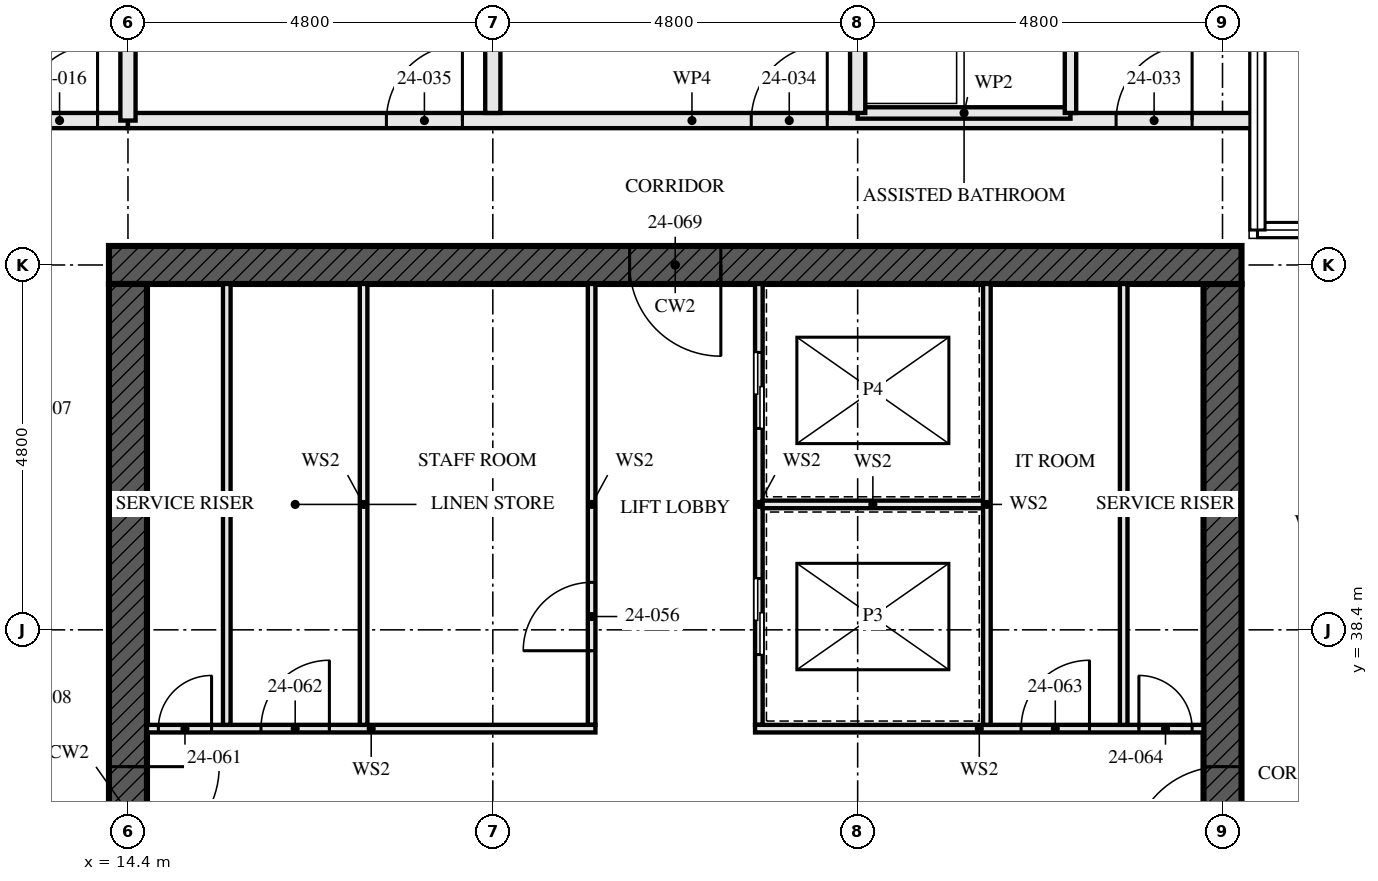
"""IFC4 building model, lengths in metres.
Left out: names, types, materials, properties, quantities, classifications, styles, units other than length and angle.
Written with IfcOpenShell. Run it as: python <this file> out.ifc"""

import sys

from ifc_helpers import new_model, si_unit, direction, frame, frame_2d, origin, place, context, subcontext, project, spatial, rectangle, extrude, element, fill, save


model = new_model("IFC4")
c1 = context("Model", 3, precision=1e-05, world=origin(), true_north=direction((0.0, 1.0)))
c2 = subcontext(c1, "Body", "Model", "MODEL_VIEW")
j1 = project(units=[si_unit("LENGTHUNIT", "METRE"), si_unit("PLANEANGLEUNIT", "RADIAN")], contexts=[c1])
p1 = place(None, origin())
s1 = spatial("IfcSite", under=j1, at=p1, CompositionType="ELEMENT")
p2 = place(p1, origin())
s2 = spatial("IfcBuilding", under=s1, at=p2, CompositionType="ELEMENT")
p3 = place(p2, frame((0.0, 0.0, 91.0)))
s3 = spatial("IfcBuildingStorey", under=s2, at=p3, CompositionType="ELEMENT", Elevation=91.0)
p4 = place(p3, frame((29.05, 43.2, -0.17), z_axis=(0.0, 0.0, 1.0), x_axis=(-1.0, 0.0, 0.0)))
e1 = element("IfcWall", 1, at=p4, inside=s3, PredefinedType="SHEAR", context=c2, shape_type="SweptSolid", body=[
    extrude(rectangle(XDim=14.9, YDim=0.5, at=frame_2d((7.45, 0.0))), origin(), (0.0, 0.0, 1.0), 3.5),
])
p5 = place(p4, frame((6.85, 0.0, 0.17)))
e2 = element("IfcOpeningElement", 2, at=p5, cuts=e1, PredefinedType="OPENING", context=c2, shape_type="SweptSolid", body=[
    extrude(rectangle(XDim=1.2, YDim=2.1, at=frame_2d((0.6, 1.05))), frame((0.0, 0.26, 0.0), z_axis=(0.0, -1.0, 0.0), x_axis=(1.0, 0.0, 0.0)), (0.0, 0.0, 1.0), 0.521),
])
p6 = place(p3, frame((14.4, 42.95, -0.17), z_axis=(0.0, 0.0, 1.0), x_axis=(0.0, -1.0, 0.0)))
e3 = element("IfcWall", 3, at=p6, inside=s3, PredefinedType="SHEAR", context=c2, shape_type="SweptSolid", body=[
    extrude(rectangle(XDim=13.9, YDim=0.5, at=frame_2d((6.95, 0.0))), origin(), (0.0, 0.0, 1.0), 3.5),
])
p7 = place(p6, frame((6.35, 0.0, 0.17)))
e4 = element("IfcOpeningElement", 4, at=p7, cuts=e3, PredefinedType="OPENING", context=c2, shape_type="SweptSolid", body=[
    extrude(rectangle(XDim=1.2, YDim=2.1, at=frame_2d((0.6, 1.05))), frame((0.0, 0.26, 0.0), z_axis=(0.0, -1.0, 0.0), x_axis=(1.0, 0.0, 0.0)), (0.0, 0.0, 1.0), 0.521),
])
p8 = place(p3, frame((28.8, 29.05, -0.17), z_axis=(0.0, 0.0, 1.0), x_axis=(0.0, 1.0, 0.0)))
e5 = element("IfcWall", 5, at=p8, inside=s3, PredefinedType="SHEAR", context=c2, shape_type="SweptSolid", body=[
    extrude(rectangle(XDim=13.9, YDim=0.5, at=frame_2d((6.95, 0.0))), origin(), (0.0, 0.0, 1.0), 3.5),
])
p9 = place(p8, frame((6.35, 0.0, 0.17)))
e6 = element("IfcOpeningElement", 6, at=p9, cuts=e5, PredefinedType="OPENING", context=c2, shape_type="SweptSolid", body=[
    extrude(rectangle(XDim=1.2, YDim=2.1, at=frame_2d((0.6, 1.05))), frame((0.0, 0.26, 0.0), z_axis=(0.0, -1.0, 0.0), x_axis=(1.0, 0.0, 0.0)), (0.0, 0.0, 1.0), 0.521),
])
p10 = place(p3, frame((14.4, 45.1, 0.0), z_axis=(0.0, 0.0, 1.0), x_axis=(-1.0, 0.0, 0.0)))
e7 = element("IfcWall", 7, at=p10, inside=s3, PredefinedType="PARTITIONING", context=c2, shape_type="SweptSolid", body=[
    extrude(rectangle(XDim=9.6, YDim=0.2, at=frame_2d((4.8, 0.0))), origin(), (0.0, 0.0, 1.0), 3.33),
])
p11 = place(p10, frame((0.4, 0.0, 0.0)))
e8 = element("IfcOpeningElement", 8, at=p11, cuts=e7, PredefinedType="OPENING", context=c2, shape_type="SweptSolid", body=[
    extrude(rectangle(XDim=1.0, YDim=2.1, at=frame_2d((0.5, 1.05))), frame((0.0, 0.111, 0.0), z_axis=(0.0, -1.0, 0.0), x_axis=(1.0, 0.0, 0.0)), (0.0, 0.0, 1.0), 0.221),
])
p12 = place(p10, frame((5.2, 0.0, 0.0)))
e9 = element("IfcOpeningElement", 9, at=p12, cuts=e7, PredefinedType="OPENING", context=c2, shape_type="SweptSolid", body=[
    extrude(rectangle(XDim=1.0, YDim=2.1, at=frame_2d((0.5, 1.05))), frame((0.0, 0.111, 0.0), z_axis=(0.0, -1.0, 0.0), x_axis=(1.0, 0.0, 0.0)), (0.0, 0.0, 1.0), 0.221),
])
p13 = place(p3, frame((26.8, 48.2, 0.0), z_axis=(0.0, 0.0, 1.0), x_axis=(0.0, -1.0, 0.0)))
e10 = element("IfcWall", 10, at=p13, inside=s3, PredefinedType="PARTITIONING", context=c2, shape_type="SweptSolid", body=[
    extrude(rectangle(XDim=3.0, YDim=0.15, at=frame_2d((1.5, 0.0))), origin(), (0.0, 0.0, 1.0), 2.55),
])
p14 = place(p13, frame((1.05, 0.0, 0.0)))
e11 = element("IfcOpeningElement", 11, at=p14, cuts=e10, PredefinedType="OPENING", context=c2, shape_type="SweptSolid", body=[
    extrude(rectangle(XDim=0.9, YDim=2.1, at=frame_2d((0.45, 1.05))), frame((0.0, 0.085, 0.0), z_axis=(0.0, -1.0, 0.0), x_axis=(1.0, 0.0, 0.0)), (0.0, 0.0, 1.0), 0.171),
])
p15 = place(p3, frame((26.8, 45.2, 0.0), z_axis=(0.0, 0.0, 1.0), x_axis=(-1.0, 0.0, 0.0)))
e12 = element("IfcWall", 12, at=p15, inside=s3, PredefinedType="PARTITIONING", context=c2, shape_type="SweptSolid", body=[
    extrude(rectangle(XDim=2.8, YDim=0.15, at=frame_2d((1.4, 0.0))), origin(), (0.0, 0.0, 1.0), 3.33),
])
p16 = place(p3, frame((24.0, 52.48, 0.0), z_axis=(0.0, 0.0, 1.0), x_axis=(0.0, -1.0, 0.0)))
e13 = element("IfcWall", 13, at=p16, inside=s3, PredefinedType="PARTITIONING", context=c2, shape_type="SweptSolid", body=[
    extrude(rectangle(XDim=7.28, YDim=0.2, at=frame_2d((3.64, 0.0))), origin(), (0.0, 0.0, 1.0), 2.55),
])
p17 = place(p3, frame((19.2, 57.28, 0.0), z_axis=(0.0, 0.0, 1.0), x_axis=(0.0, -1.0, 0.0)))
e14 = element("IfcWall", 14, at=p17, inside=s3, PredefinedType="PARTITIONING", context=c2, shape_type="SweptSolid", body=[
    extrude(rectangle(XDim=12.08, YDim=0.2, at=frame_2d((6.04, 0.0))), origin(), (0.0, 0.0, 1.0), 2.55),
])
p18 = place(p3, frame((29.24, 45.1, 0.0), z_axis=(0.0, 0.0, 1.0), x_axis=(-1.0, 0.0, 0.0)))
e15 = element("IfcWall", 15, at=p18, inside=s3, PredefinedType="PARTITIONING", context=c2, shape_type="SweptSolid", body=[
    extrude(rectangle(XDim=14.84, YDim=0.2, at=frame_2d((7.42, 0.0))), origin(), (0.0, 0.0, 1.0), 2.32),
])
p19 = place(p18, frame((0.84, 0.0, 0.0)))
e16 = element("IfcOpeningElement", 16, at=p19, cuts=e15, PredefinedType="OPENING", context=c2, shape_type="SweptSolid", body=[
    extrude(rectangle(XDim=1.0, YDim=2.1, at=frame_2d((0.5, 1.05))), frame((0.0, 0.111, 0.0), z_axis=(0.0, -1.0, 0.0), x_axis=(1.0, 0.0, 0.0)), (0.0, 0.0, 1.0), 0.221),
])
p20 = place(p18, frame((5.64, 0.0, 0.0)))
e17 = element("IfcOpeningElement", 17, at=p20, cuts=e15, PredefinedType="OPENING", context=c2, shape_type="SweptSolid", body=[
    extrude(rectangle(XDim=1.0, YDim=2.1, at=frame_2d((0.5, 1.05))), frame((0.0, 0.111, 0.0), z_axis=(0.0, -1.0, 0.0), x_axis=(1.0, 0.0, 0.0)), (0.0, 0.0, 1.0), 0.221),
])
p21 = place(p18, frame((10.44, 0.0, 0.0)))
e18 = element("IfcOpeningElement", 18, at=p21, cuts=e15, PredefinedType="OPENING", context=c2, shape_type="SweptSolid", body=[
    extrude(rectangle(XDim=1.0, YDim=2.1, at=frame_2d((0.5, 1.05))), frame((0.0, 0.111, 0.0), z_axis=(0.0, -1.0, 0.0), x_axis=(1.0, 0.0, 0.0)), (0.0, 0.0, 1.0), 0.221),
])
for number, where, z_axis, x_axis in (
    (19, (15.7, 37.15, 0.0), (0.0, 0.0, 1.0), (0.0, 1.0, 0.0)),
    (20, (27.5, 37.15, 0.0), (0.0, 0.0, 1.0), (0.0, 1.0, 0.0)),
):
    element("IfcWall", number, at=place(p3, frame(where, z_axis=z_axis, x_axis=x_axis)), inside=s3, PredefinedType="SOLIDWALL", context=c2, shape_type="SweptSolid", body=[
        extrude(rectangle(XDim=5.8, YDim=0.1, at=frame_2d((2.9, 0.0))), origin(), (0.0, 0.0, 1.0), 3.33),
    ])
p22 = place(p3, frame((20.5, 37.15, 0.0), z_axis=(0.0, 0.0, 1.0), x_axis=(0.0, 1.0, 0.0)))
e21 = element("IfcWall", 21, at=p22, inside=s3, PredefinedType="SOLIDWALL", context=c2, shape_type="SweptSolid", body=[
    extrude(rectangle(XDim=5.8, YDim=0.1, at=frame_2d((2.9, 0.0))), origin(), (0.0, 0.0, 1.0), 3.33),
])
p23 = place(p22, frame((0.975, 0.0, 0.0)))
e22 = element("IfcOpeningElement", 22, at=p23, cuts=e21, PredefinedType="OPENING", context=c2, shape_type="SweptSolid", body=[
    extrude(rectangle(XDim=0.9, YDim=2.1, at=frame_2d((0.45, 1.05))), frame((0.0, 0.061, 0.0), z_axis=(0.0, -1.0, 0.0), x_axis=(1.0, 0.0, 0.0)), (0.0, 0.0, 1.0), 0.121),
])
p24 = place(p3, frame((22.7, 37.15, 0.0), z_axis=(0.0, 0.0, 1.0), x_axis=(0.0, 1.0, 0.0)))
e23 = element("IfcWall", 23, at=p24, inside=s3, PredefinedType="SOLIDWALL", context=c2, shape_type="SweptSolid", body=[
    extrude(rectangle(XDim=5.8, YDim=0.1, at=frame_2d((2.9, 0.0))), origin(), (0.0, 0.0, 1.0), 3.33),
])
p25 = place(p24, frame((0.925, 0.0, 0.0)))
e24 = element("IfcOpeningElement", 24, at=p25, cuts=e23, PredefinedType="OPENING", context=c2, shape_type="SweptSolid", body=[
    extrude(rectangle(XDim=1.0, YDim=2.1, at=frame_2d((0.5, 1.05))), frame((0.0, 0.061, 0.0), z_axis=(0.0, -1.0, 0.0), x_axis=(1.0, 0.0, 0.0)), (0.0, 0.0, 1.0), 0.121),
])
p26 = place(p24, frame((3.9, 0.0, 0.0)))
e25 = element("IfcOpeningElement", 25, at=p26, cuts=e23, PredefinedType="OPENING", context=c2, shape_type="SweptSolid", body=[
    extrude(rectangle(XDim=1.0, YDim=2.1, at=frame_2d((0.5, 1.05))), frame((0.0, 0.061, 0.0), z_axis=(0.0, -1.0, 0.0), x_axis=(1.0, 0.0, 0.0)), (0.0, 0.0, 1.0), 0.121),
])
p27 = place(p3, frame((14.65, 37.1, 0.0), z_axis=(0.0, 0.0, 1.0), x_axis=(1.0, 0.0, 0.0)))
e26 = element("IfcWall", 26, at=p27, inside=s3, PredefinedType="SOLIDWALL", context=c2, shape_type="SweptSolid", body=[
    extrude(rectangle(XDim=5.9, YDim=0.1, at=frame_2d((2.95, 0.0))), origin(), (0.0, 0.0, 1.0), 3.33),
])
p28 = place(p27, frame((0.15, 0.0, 0.0)))
e27 = element("IfcOpeningElement", 27, at=p28, cuts=e26, PredefinedType="OPENING", context=c2, shape_type="SweptSolid", body=[
    extrude(rectangle(XDim=0.7, YDim=2.1, at=frame_2d((0.35, 1.05))), frame((0.0, 0.061, 0.0), z_axis=(0.0, -1.0, 0.0), x_axis=(1.0, 0.0, 0.0)), (0.0, 0.0, 1.0), 0.121),
])
p29 = place(p27, frame((1.5, 0.0, 0.0)))
e28 = element("IfcOpeningElement", 28, at=p29, cuts=e26, PredefinedType="OPENING", context=c2, shape_type="SweptSolid", body=[
    extrude(rectangle(XDim=0.9, YDim=2.1, at=frame_2d((0.45, 1.05))), frame((0.0, 0.061, 0.0), z_axis=(0.0, -1.0, 0.0), x_axis=(1.0, 0.0, 0.0)), (0.0, 0.0, 1.0), 0.121),
])
p30 = place(p3, frame((22.65, 37.1, 0.0), z_axis=(0.0, 0.0, 1.0), x_axis=(1.0, 0.0, 0.0)))
e29 = element("IfcWall", 29, at=p30, inside=s3, PredefinedType="SOLIDWALL", context=c2, shape_type="SweptSolid", body=[
    extrude(rectangle(XDim=5.9, YDim=0.1, at=frame_2d((2.95, 0.0))), origin(), (0.0, 0.0, 1.0), 3.33),
])
p31 = place(p30, frame((3.5, 0.0, 0.0)))
e30 = element("IfcOpeningElement", 30, at=p31, cuts=e29, PredefinedType="OPENING", context=c2, shape_type="SweptSolid", body=[
    extrude(rectangle(XDim=0.9, YDim=2.1, at=frame_2d((0.45, 1.05))), frame((0.0, 0.061, 0.0), z_axis=(0.0, -1.0, 0.0), x_axis=(1.0, 0.0, 0.0)), (0.0, 0.0, 1.0), 0.121),
])
p32 = place(p30, frame((5.05, 0.0, 0.0)))
e31 = element("IfcOpeningElement", 31, at=p32, cuts=e29, PredefinedType="OPENING", context=c2, shape_type="SweptSolid", body=[
    extrude(rectangle(XDim=0.7, YDim=2.1, at=frame_2d((0.35, 1.05))), frame((0.0, 0.061, 0.0), z_axis=(0.0, -1.0, 0.0), x_axis=(1.0, 0.0, 0.0)), (0.0, 0.0, 1.0), 0.121),
])
p33 = place(p3, frame((17.5, 37.15, 0.0), z_axis=(0.0, 0.0, 1.0), x_axis=(0.0, 1.0, 0.0)))
e32 = element("IfcWall", 32, at=p33, inside=s3, PredefinedType="SOLIDWALL", context=c2, shape_type="SweptSolid", body=[
    extrude(rectangle(XDim=5.8, YDim=0.1, at=frame_2d((2.9, 0.0))), origin(), (0.0, 0.0, 1.0), 3.33),
])
p34 = place(p3, frame((22.75, 40.05, 0.0), z_axis=(0.0, 0.0, 1.0), x_axis=(1.0, 0.0, 0.0)))
e33 = element("IfcWall", 33, at=p34, inside=s3, PredefinedType="SOLIDWALL", context=c2, shape_type="SweptSolid", body=[
    extrude(rectangle(XDim=2.9, YDim=0.1, at=frame_2d((1.45, 0.0))), origin(), (0.0, 0.0, 1.0), 3.33),
])
p35 = place(p3, frame((25.7, 37.15, 0.0), z_axis=(0.0, 0.0, 1.0), x_axis=(0.0, 1.0, 0.0)))
e34 = element("IfcWall", 34, at=p35, inside=s3, PredefinedType="SOLIDWALL", context=c2, shape_type="SweptSolid", body=[
    extrude(rectangle(XDim=5.8, YDim=0.1, at=frame_2d((2.9, 0.0))), origin(), (0.0, 0.0, 1.0), 3.33),
])
p36 = place(p3, frame((14.4, 45.1, 0.0), z_axis=(0.0, 0.0, 1.0), x_axis=(0.0, 1.0, 0.0)))
e35 = element("IfcWall", 35, at=p36, inside=s3, PredefinedType="PARTITIONING", context=c2, shape_type="SweptSolid", body=[
    extrude(rectangle(XDim=2.605, YDim=0.2, at=frame_2d((1.302, 0.0))), origin(), (0.0, 0.0, 1.0), 2.32),
])
p37 = place(p11, frame((1.0, 0.0, 0.0), z_axis=(0.0, 0.0, 1.0), x_axis=(-1.0, 0.0, 0.0)))
e36 = element("IfcDoor", 36, at=p37, inside=s3, OperationType="SINGLE_SWING_LEFT", PredefinedType="DOOR", context=c2, shape_type="SweptSolid", body=[
    extrude(rectangle(XDim=1.0, YDim=2.1, at=frame_2d((0.5, 1.05))), frame((0.0, 0.027, 0.0), z_axis=(0.0, -1.0, 0.0), x_axis=(1.0, 0.0, 0.0)), (0.0, 0.0, 1.0), 0.054),
])
fill(e8, e36)
p38 = place(p19, frame((1.0, 0.0, 0.0), z_axis=(0.0, 0.0, 1.0), x_axis=(-1.0, 0.0, 0.0)))
e37 = element("IfcDoor", 37, at=p38, inside=s3, OperationType="SINGLE_SWING_LEFT", PredefinedType="DOOR", context=c2, shape_type="SweptSolid", body=[
    extrude(rectangle(XDim=1.0, YDim=2.1, at=frame_2d((0.5, 1.05))), frame((0.0, 0.027, 0.0), z_axis=(0.0, -1.0, 0.0), x_axis=(1.0, 0.0, 0.0)), (0.0, 0.0, 1.0), 0.054),
])
fill(e16, e37)
p39 = place(p20, frame((1.0, 0.0, 0.0), z_axis=(0.0, 0.0, 1.0), x_axis=(-1.0, 0.0, 0.0)))
e38 = element("IfcDoor", 38, at=p39, inside=s3, OperationType="SINGLE_SWING_LEFT", PredefinedType="DOOR", context=c2, shape_type="SweptSolid", body=[
    extrude(rectangle(XDim=1.0, YDim=2.1, at=frame_2d((0.5, 1.05))), frame((0.0, 0.027, 0.0), z_axis=(0.0, -1.0, 0.0), x_axis=(1.0, 0.0, 0.0)), (0.0, 0.0, 1.0), 0.054),
])
fill(e17, e38)
p40 = place(p21, frame((1.0, 0.0, 0.0), z_axis=(0.0, 0.0, 1.0), x_axis=(-1.0, 0.0, 0.0)))
e39 = element("IfcDoor", 39, at=p40, inside=s3, OperationType="SINGLE_SWING_LEFT", PredefinedType="DOOR", context=c2, shape_type="SweptSolid", body=[
    extrude(rectangle(XDim=1.0, YDim=2.1, at=frame_2d((0.5, 1.05))), frame((0.0, 0.027, 0.0), z_axis=(0.0, -1.0, 0.0), x_axis=(1.0, 0.0, 0.0)), (0.0, 0.0, 1.0), 0.054),
])
fill(e18, e39)
p41 = place(p23, origin())
e40 = element("IfcDoor", 40, at=p41, inside=s3, OperationType="SINGLE_SWING_RIGHT", PredefinedType="DOOR", context=c2, shape_type="SweptSolid", body=[
    extrude(rectangle(XDim=0.9, YDim=2.1, at=frame_2d((0.45, 1.05))), frame((0.0, 0.027, 0.0), z_axis=(0.0, -1.0, 0.0), x_axis=(1.0, 0.0, 0.0)), (0.0, 0.0, 1.0), 0.054),
])
fill(e22, e40)
p42 = place(p25, origin())
e41 = element("IfcDoor", 41, at=p42, inside=s3, OperationType="SLIDING_TO_LEFT", PredefinedType="DOOR", context=c2, shape_type="SweptSolid", body=[
    extrude(rectangle(XDim=1.0, YDim=2.1, at=frame_2d((0.5, 1.05))), frame((0.0, 0.05, 0.0), z_axis=(0.0, -1.0, 0.0), x_axis=(1.0, 0.0, 0.0)), (0.0, 0.0, 1.0), 0.1),
])
fill(e24, e41)
p43 = place(p26, origin())
e42 = element("IfcDoor", 42, at=p43, inside=s3, OperationType="SLIDING_TO_LEFT", PredefinedType="DOOR", context=c2, shape_type="SweptSolid", body=[
    extrude(rectangle(XDim=1.0, YDim=2.1, at=frame_2d((0.5, 1.05))), frame((0.0, 0.05, 0.0), z_axis=(0.0, -1.0, 0.0), x_axis=(1.0, 0.0, 0.0)), (0.0, 0.0, 1.0), 0.1),
])
fill(e25, e42)
p44 = place(p28, origin())
e43 = element("IfcDoor", 43, at=p44, inside=s3, OperationType="SINGLE_SWING_LEFT", PredefinedType="DOOR", context=c2, shape_type="SweptSolid", body=[
    extrude(rectangle(XDim=0.7, YDim=2.1, at=frame_2d((0.35, 1.05))), frame((0.0, 0.027, 0.0), z_axis=(0.0, -1.0, 0.0), x_axis=(1.0, 0.0, 0.0)), (0.0, 0.0, 1.0), 0.054),
])
fill(e27, e43)
p45 = place(p29, origin())
e44 = element("IfcDoor", 44, at=p45, inside=s3, OperationType="SINGLE_SWING_LEFT", PredefinedType="DOOR", context=c2, shape_type="SweptSolid", body=[
    extrude(rectangle(XDim=0.9, YDim=2.1, at=frame_2d((0.45, 1.05))), frame((0.0, 0.027, 0.0), z_axis=(0.0, -1.0, 0.0), x_axis=(1.0, 0.0, 0.0)), (0.0, 0.0, 1.0), 0.054),
])
fill(e28, e44)
p46 = place(p31, origin())
e45 = element("IfcDoor", 45, at=p46, inside=s3, OperationType="SINGLE_SWING_LEFT", PredefinedType="DOOR", context=c2, shape_type="SweptSolid", body=[
    extrude(rectangle(XDim=0.9, YDim=2.1, at=frame_2d((0.45, 1.05))), frame((0.0, 0.027, 0.0), z_axis=(0.0, -1.0, 0.0), x_axis=(1.0, 0.0, 0.0)), (0.0, 0.0, 1.0), 0.054),
])
fill(e30, e45)
p47 = place(p32, origin())
e46 = element("IfcDoor", 46, at=p47, inside=s3, OperationType="SINGLE_SWING_RIGHT", PredefinedType="DOOR", context=c2, shape_type="SweptSolid", body=[
    extrude(rectangle(XDim=0.7, YDim=2.1, at=frame_2d((0.35, 1.05))), frame((0.0, 0.027, 0.0), z_axis=(0.0, -1.0, 0.0), x_axis=(1.0, 0.0, 0.0)), (0.0, 0.0, 1.0), 0.054),
])
fill(e31, e46)
p48 = place(p7, origin())
e47 = element("IfcDoor", 47, at=p48, inside=s3, OperationType="SINGLE_SWING_LEFT", PredefinedType="DOOR", context=c2, shape_type="SweptSolid", body=[
    extrude(rectangle(XDim=1.2, YDim=2.1, at=frame_2d((0.6, 1.05))), frame((0.0, 0.027, 0.0), z_axis=(0.0, -1.0, 0.0), x_axis=(1.0, 0.0, 0.0)), (0.0, 0.0, 1.0), 0.054),
])
fill(e4, e47)
p49 = place(p9, origin())
e48 = element("IfcDoor", 48, at=p49, inside=s3, OperationType="SINGLE_SWING_LEFT", PredefinedType="DOOR", context=c2, shape_type="SweptSolid", body=[
    extrude(rectangle(XDim=1.2, YDim=2.1, at=frame_2d((0.6, 1.05))), frame((0.0, 0.027, 0.0), z_axis=(0.0, -1.0, 0.0), x_axis=(1.0, 0.0, 0.0)), (0.0, 0.0, 1.0), 0.054),
])
fill(e6, e48)
p50 = place(p5, origin())
e49 = element("IfcDoor", 49, at=p50, inside=s3, OperationType="SINGLE_SWING_LEFT", PredefinedType="DOOR", context=c2, shape_type="SweptSolid", body=[
    extrude(rectangle(XDim=1.2, YDim=2.1, at=frame_2d((0.6, 1.05))), frame((0.0, 0.027, 0.0), z_axis=(0.0, -1.0, 0.0), x_axis=(1.0, 0.0, 0.0)), (0.0, 0.0, 1.0), 0.054),
])
fill(e2, e49)
save(model, sys.argv[1])
